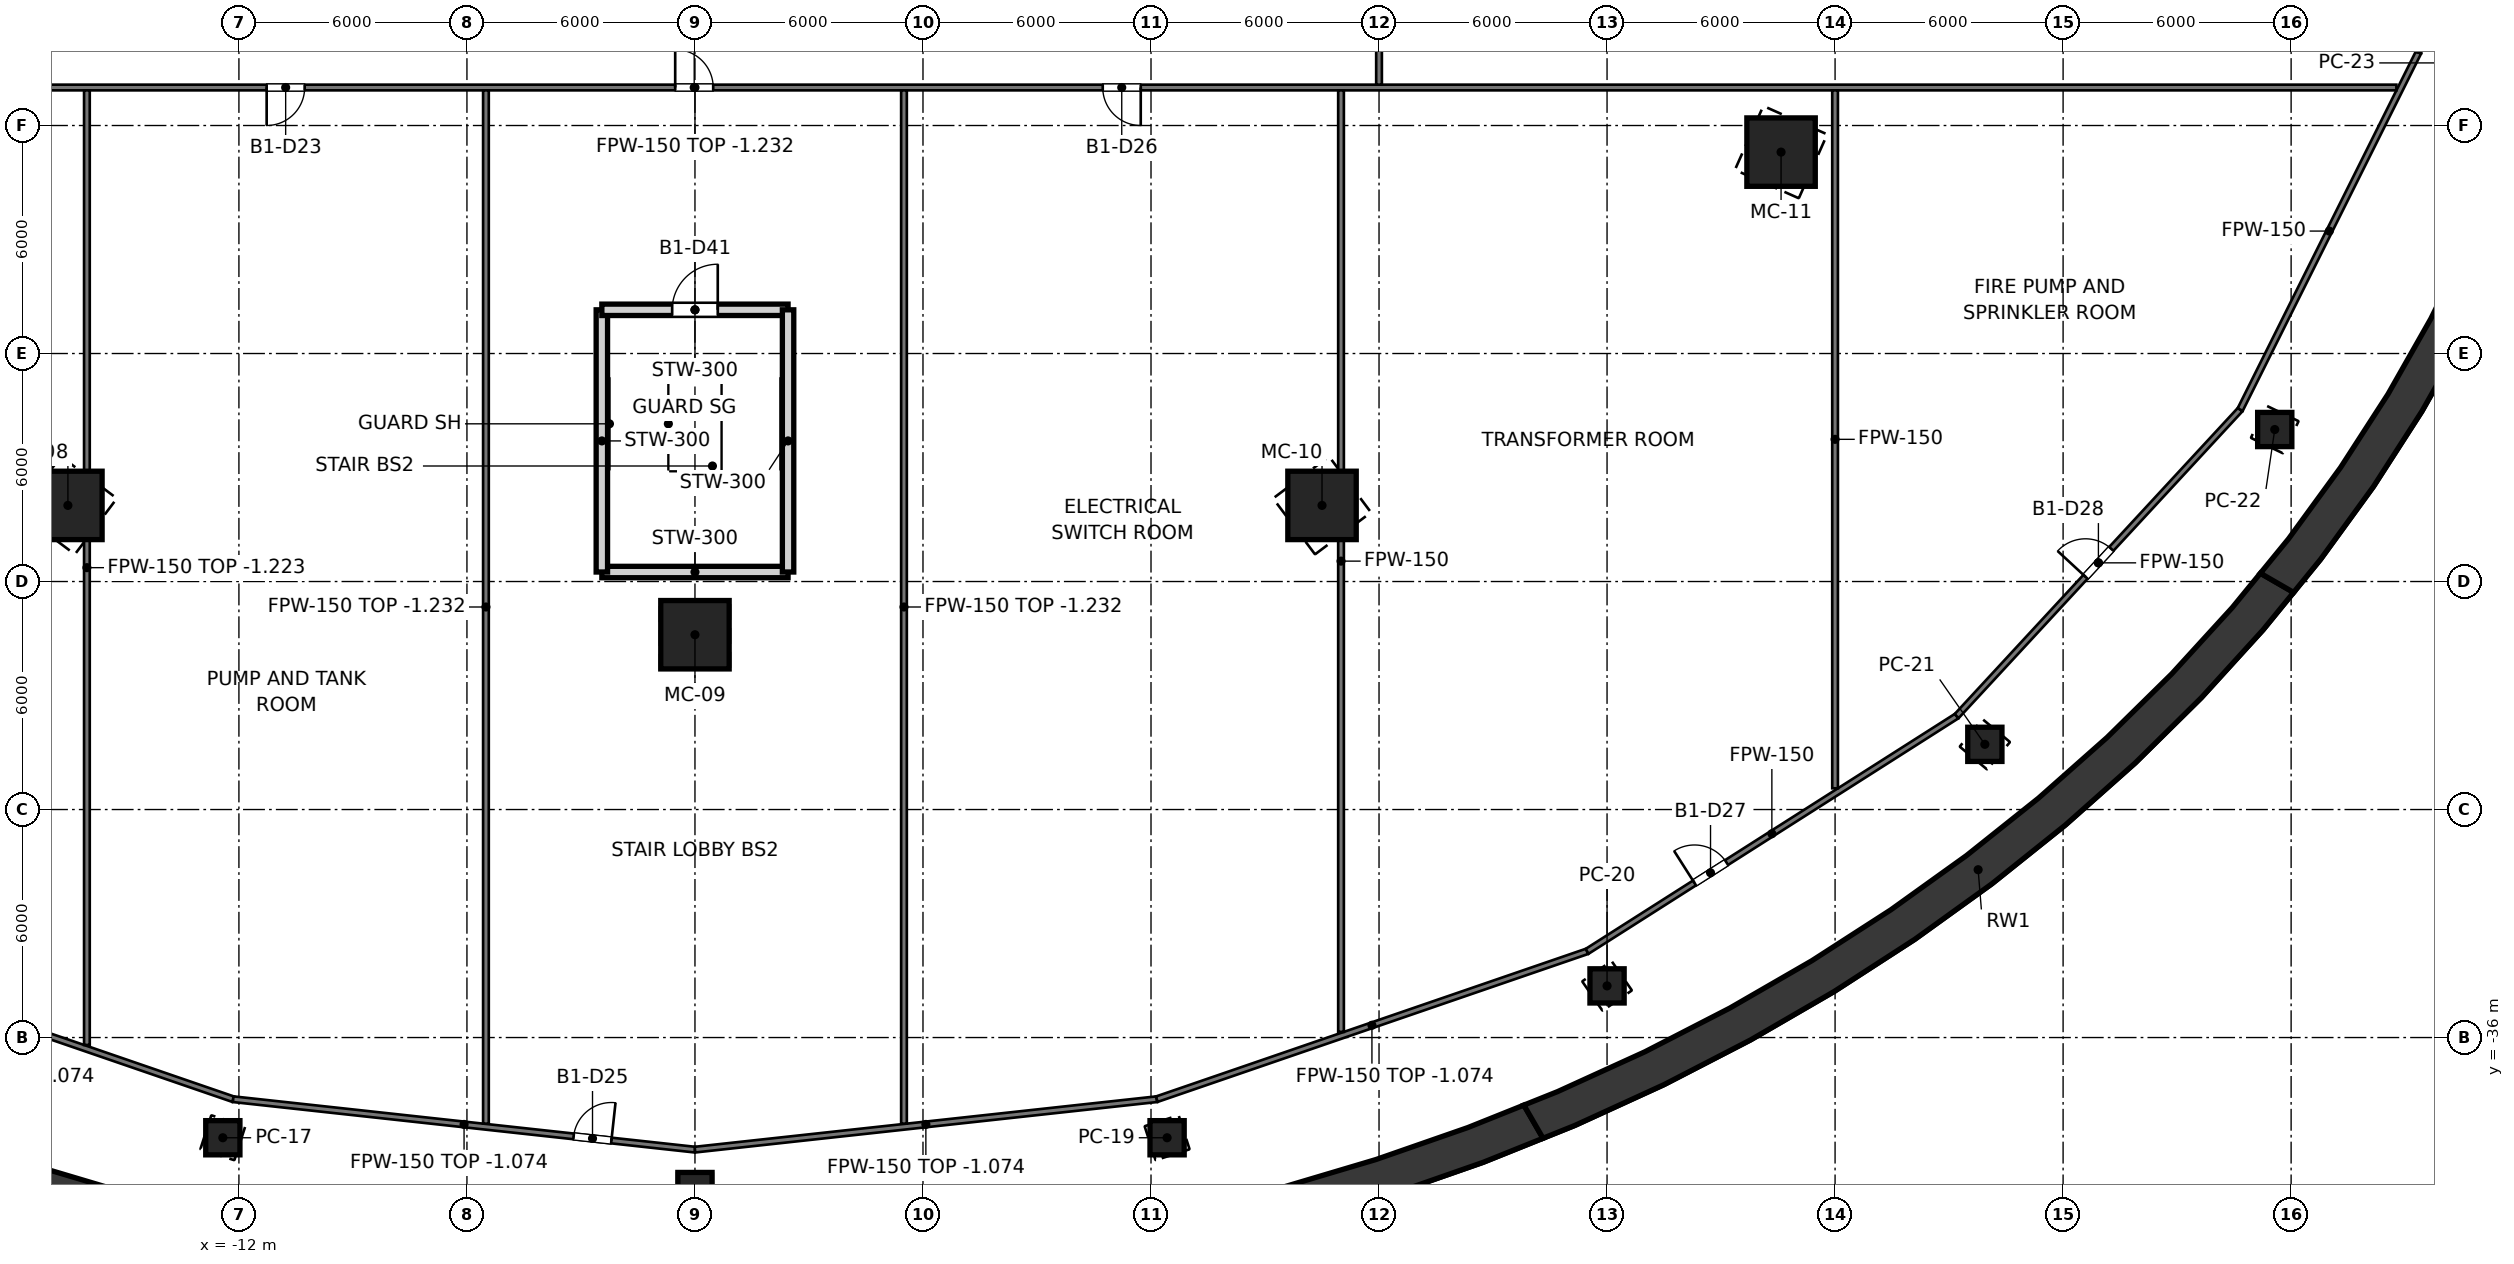
"""IFC4 building model, lengths in metres.
Left out: names, types, materials, properties, quantities, classifications, styles, units other than length and angle.
Written with IfcOpenShell. Run it as: python <this file> out.ifc"""

import sys

from ifc_helpers import new_model, si_unit, direction, frame, frame_2d, origin, origin_2d, place, context, subcontext, project, spatial, polyline, rectangle, hollow_rectangle, outline, extrude, element, fill, save


model = new_model("IFC4")
c1 = context("Model", 3, precision=1e-05, world=origin(), true_north=direction((0.0, 1.0)))
c2 = subcontext(c1, "Body", "Model", "MODEL_VIEW")
j1 = project(units=[si_unit("LENGTHUNIT", "METRE"), si_unit("PLANEANGLEUNIT", "RADIAN")], contexts=[c1])
p1 = place(None, origin())
s1 = spatial("IfcSite", under=j1, at=p1, CompositionType="ELEMENT")
p2 = place(p1, origin())
s2 = spatial("IfcBuilding", under=s1, at=p2, CompositionType="ELEMENT")
p3 = place(p2, frame((0.0, 0.0, -5.0)))
s3 = spatial("IfcBuildingStorey", under=s2, at=p3, CompositionType="ELEMENT", Elevation=-5.0)
p4 = place(p3, frame((0.0, 0.0, -0.3)))
e1 = element("IfcWall", 1, at=p4, inside=s3, PredefinedType="SOLIDWALL", context=c2, shape_type="SweptSolid", body=[
    extrude(outline(polyline([(0.0, -43.0), (0.0, -42.0), (-2.617, -41.942), (-5.226, -41.77), (-7.822, -41.483), (-10.396, -41.082), (-12.941, -40.569), (-15.451, -39.944), (-17.918, -39.21), (-20.337, -38.369), (-21.811, -37.778), (-22.315, -38.651), (-20.744, -39.282), (-18.277, -40.144), (-15.76, -40.896), (-13.2, -41.535), (-10.604, -42.06), (-7.978, -42.471), (-5.331, -42.764), (-2.669, -42.941), (0.0, -43.0)])), origin(), (0.0, 0.0, 1.0), 5.1),
])
e2 = element("IfcWall", 2, at=p4, inside=s3, PredefinedType="SOLIDWALL", context=c2, shape_type="SweptSolid", body=[
    extrude(outline(polyline([(22.315, -38.651), (21.811, -37.778), (20.337, -38.369), (17.918, -39.21), (15.451, -39.944), (12.941, -40.569), (10.396, -41.082), (7.822, -41.483), (5.226, -41.77), (2.617, -41.942), (0.0, -42.0), (0.0, -42.0), (0.0, -43.0), (0.0, -43.0), (2.669, -42.941), (5.331, -42.764), (7.978, -42.471), (10.604, -42.06), (13.2, -41.535), (15.76, -40.896), (18.277, -40.144), (20.744, -39.282), (22.315, -38.651)])), origin(), (0.0, 0.0, 1.0), 5.1),
])
e3 = element("IfcWall", 3, at=p4, inside=s3, PredefinedType="SOLIDWALL", context=c2, shape_type="SweptSolid", body=[
    extrude(outline(polyline([(42.065, -24.287), (41.191, -23.782), (40.451, -24.687), (38.857, -26.431), (37.157, -28.104), (35.355, -29.698), (33.457, -31.212), (31.466, -32.64), (29.389, -33.979), (27.232, -35.224), (25.0, -36.373), (22.699, -37.422), (21.811, -37.778), (22.315, -38.651), (23.154, -38.313), (25.5, -37.239), (27.777, -36.063), (29.977, -34.788), (32.095, -33.417), (34.126, -31.955), (36.062, -30.406), (37.9, -28.773), (39.635, -27.061), (41.26, -25.275), (42.065, -24.287)])), origin(), (0.0, 0.0, 1.0), 5.1),
])
e4 = element("IfcWall", 4, at=p4, inside=s3, PredefinedType="SOLIDWALL", context=c2, shape_type="SweptSolid", body=[
    extrude(outline(polyline([(50.93, -2.25), (51.0, 0.0), (50.0, 0.0), (49.931, -2.198), (49.726, -4.39), (49.385, -6.57), (48.907, -8.732), (48.296, -10.87), (47.553, -12.979), (46.679, -15.052), (45.677, -17.083), (44.55, -19.068), (43.301, -21.0), (41.934, -22.875), (41.191, -23.782), (42.065, -24.287), (42.772, -23.419), (44.167, -21.5), (45.441, -19.521), (46.591, -17.49), (47.613, -15.41), (48.504, -13.288), (49.262, -11.129), (49.885, -8.94), (50.372, -6.727), (50.721, -4.495), (50.93, -2.25)])), origin(), (0.0, 0.0, 1.0), 5.1),
])
for number, where, z_axis, x_axis in (
    (5, (-16.5, -21.997, -0.3), (0.0, 0.0, 1.0), (-0.6, -0.8, 0.0)),
    (6, (0.0, -25.4, -0.3), (0.0, 0.0, 1.0), (0.0, -1.0, 0.0)),
    (7, (16.5, -21.997, -0.3), (0.0, 0.0, 1.0), (0.6, -0.8, 0.0)),
    (8, (28.579, -12.7, -0.3), (0.0, 0.0, 1.0), (0.914, -0.406, 0.0)),
):
    element("IfcColumn", number, at=place(p3, frame(where, z_axis=z_axis, x_axis=x_axis)), inside=s3, PredefinedType="COLUMN", context=c2, shape_type="SweptSolid", body=[
        extrude(hollow_rectangle(XDim=1.8, YDim=1.8, WallThickness=0.08, at=origin_2d()), origin(), (0.0, 0.0, 1.0), 5.3),
    ])
for number, where, z_axis, x_axis in (
    (9, (-12.423, -38.637, -0.3), (0.0, 0.0, 1.0), (-0.306, -0.952, 0.0)),
    (10, (0.0, -40.0, -0.3), (0.0, 0.0, 1.0), (0.0, -1.0, 0.0)),
    (11, (12.423, -38.637, -0.3), (0.0, 0.0, 1.0), (0.306, -0.952, 0.0)),
    (12, (24.0, -34.641, -0.3), (0.0, 0.0, 1.0), (0.569, -0.822, 0.0)),
    (13, (33.941, -28.284, -0.3), (0.0, 0.0, 1.0), (0.768, -0.64, 0.0)),
    (14, (41.569, -20.0, -0.3), (0.0, 0.0, 1.0), (0.901, -0.434, 0.0)),
):
    element("IfcColumn", number, at=place(p3, frame(where, z_axis=z_axis, x_axis=x_axis)), inside=s3, PredefinedType="COLUMN", context=c2, shape_type="SweptSolid", body=[
        extrude(hollow_rectangle(XDim=0.9, YDim=0.9, WallThickness=0.04, at=origin_2d()), origin(), (0.0, 0.0, 1.0), 5.3),
    ])
p5 = place(p3, frame((2.45, -23.75, 0.0), z_axis=(0.0, 0.0, 1.0), x_axis=(-1.0, 0.0, 0.0)))
e15 = element("IfcWall", 15, at=p5, inside=s3, PredefinedType="SOLIDWALL", context=c2, shape_type="SweptSolid", body=[
    extrude(rectangle(XDim=4.9, YDim=0.3, at=frame_2d((2.45, 0.0))), origin(), (0.0, 0.0, 1.0), 4.7),
])
p6 = place(p3, frame((-2.45, -23.75, 0.0), z_axis=(0.0, 0.0, 1.0), x_axis=(0.0, 1.0, 0.0)))
e16 = element("IfcWall", 16, at=p6, inside=s3, PredefinedType="SOLIDWALL", context=c2, shape_type="SweptSolid", body=[
    extrude(rectangle(XDim=6.9, YDim=0.3, at=frame_2d((3.45, 0.0))), origin(), (0.0, 0.0, 1.0), 4.7),
])
p7 = place(p3, frame((-2.45, -16.85, 0.0), z_axis=(0.0, 0.0, 1.0), x_axis=(1.0, 0.0, 0.0)))
e17 = element("IfcWall", 17, at=p7, inside=s3, PredefinedType="SOLIDWALL", context=c2, shape_type="SweptSolid", body=[
    extrude(rectangle(XDim=4.9, YDim=0.3, at=frame_2d((2.45, 0.0))), origin(), (0.0, 0.0, 1.0), 4.7),
])
p8 = place(p7, frame((1.85, 0.0, 0.0)))
e18 = element("IfcOpeningElement", 18, at=p8, cuts=e17, PredefinedType="OPENING", context=c2, shape_type="SweptSolid", body=[
    extrude(rectangle(XDim=1.2, YDim=2.1, at=frame_2d((0.6, 1.05))), frame((0.0, 0.15, 0.0), z_axis=(0.0, -1.0, 0.0), x_axis=(1.0, 0.0, 0.0)), (0.0, 0.0, 1.0), 0.3),
])
p9 = place(p3, frame((2.45, -16.85, 0.0), z_axis=(0.0, 0.0, 1.0), x_axis=(0.0, -1.0, 0.0)))
e19 = element("IfcWall", 19, at=p9, inside=s3, PredefinedType="SOLIDWALL", context=c2, shape_type="SweptSolid", body=[
    extrude(rectangle(XDim=6.9, YDim=0.3, at=frame_2d((3.45, 0.0))), origin(), (0.0, 0.0, 1.0), 4.7),
])
p10 = place(p3, frame((-23.475, -33.732, 0.0), z_axis=(0.0, 0.0, 1.0), x_axis=(0.945720874623, -0.324980041391, 0.0)))
e20 = element("IfcWall", 20, at=p10, inside=s3, PredefinedType="PARTITIONING", context=c2, shape_type="SweptSolid", body=[
    extrude(rectangle(XDim=11.973, YDim=0.15, at=frame_2d((5.987, 0.0))), origin(), (0.0, 0.0, 1.0), 3.926),
])
p11 = place(p3, frame((-12.152, -37.623, 0.0), z_axis=(0.0, 0.0, 1.0), x_axis=(0.994088780117, -0.108570241069, 0.0)))
e21 = element("IfcWall", 21, at=p11, inside=s3, PredefinedType="PARTITIONING", context=c2, shape_type="SweptSolid", body=[
    extrude(rectangle(XDim=12.224, YDim=0.15, at=frame_2d((6.112, 0.0))), origin(), (0.0, 0.0, 1.0), 3.926),
])
p12 = place(p11, frame((9.012, 0.0, 0.0)))
e22 = element("IfcOpeningElement", 22, at=p12, cuts=e21, PredefinedType="OPENING", context=c2, shape_type="SweptSolid", body=[
    extrude(rectangle(XDim=1.0, YDim=2.1, at=frame_2d((0.5, 1.05))), frame((0.0, 0.075, 0.0), z_axis=(0.0, -1.0, 0.0), x_axis=(1.0, 0.0, 0.0)), (0.0, 0.0, 1.0), 0.15),
])
p13 = place(p3, frame((0.0, -38.95, 0.0), z_axis=(0.0, 0.0, 1.0), x_axis=(0.994088780117, 0.108570241069, 0.0)))
e23 = element("IfcWall", 23, at=p13, inside=s3, PredefinedType="PARTITIONING", context=c2, shape_type="SweptSolid", body=[
    extrude(rectangle(XDim=12.224, YDim=0.15, at=frame_2d((6.112, 0.0))), origin(), (0.0, 0.0, 1.0), 3.926),
])
p14 = place(p3, frame((12.152, -37.623, 0.0), z_axis=(0.0, 0.0, 1.0), x_axis=(0.945720874623, 0.324980041391, 0.0)))
e24 = element("IfcWall", 24, at=p14, inside=s3, PredefinedType="PARTITIONING", context=c2, shape_type="SweptSolid", body=[
    extrude(rectangle(XDim=11.973, YDim=0.15, at=frame_2d((5.987, 0.0))), origin(), (0.0, 0.0, 1.0), 3.926),
])
p15 = place(p3, frame((23.475, -33.732, 0.0), z_axis=(0.0, 0.0, 1.0), x_axis=(0.84357600759, 0.537009794527, 0.0)))
e25 = element("IfcWall", 25, at=p15, inside=s3, PredefinedType="PARTITIONING", context=c2, shape_type="SweptSolid", body=[
    extrude(rectangle(XDim=11.527, YDim=0.15, at=frame_2d((5.763, 0.0))), origin(), (0.0, 0.0, 1.0), 3.845),
])
p16 = place(p15, frame((3.35, 0.0, 0.0)))
e26 = element("IfcOpeningElement", 26, at=p16, cuts=e25, PredefinedType="OPENING", context=c2, shape_type="SweptSolid", body=[
    extrude(rectangle(XDim=1.0, YDim=2.1, at=frame_2d((0.5, 1.05))), frame((0.0, 0.075, 0.0), z_axis=(0.0, -1.0, 0.0), x_axis=(1.0, 0.0, 0.0)), (0.0, 0.0, 1.0), 0.15),
])
p17 = place(p3, frame((33.199, -27.542, 0.0), z_axis=(0.0, 0.0, 1.0), x_axis=(0.679018932137, 0.734120759685, 0.0)))
e27 = element("IfcWall", 27, at=p17, inside=s3, PredefinedType="PARTITIONING", context=c2, shape_type="SweptSolid", body=[
    extrude(rectangle(XDim=10.988, YDim=0.15, at=frame_2d((5.494, 0.0))), origin(), (0.0, 0.0, 1.0), 3.845),
])
p18 = place(p17, frame((4.994, 0.0, 0.0)))
e28 = element("IfcOpeningElement", 28, at=p18, cuts=e27, PredefinedType="OPENING", context=c2, shape_type="SweptSolid", body=[
    extrude(rectangle(XDim=1.0, YDim=2.1, at=frame_2d((0.5, 1.05))), frame((0.0, 0.075, 0.0), z_axis=(0.0, -1.0, 0.0), x_axis=(1.0, 0.0, 0.0)), (0.0, 0.0, 1.0), 0.15),
])
p19 = place(p3, frame((40.66, -19.475, 0.0), z_axis=(0.0, 0.0, 1.0), x_axis=(0.446692676619, 0.894687460879, 0.0)))
e29 = element("IfcWall", 29, at=p19, inside=s3, PredefinedType="PARTITIONING", context=c2, shape_type="SweptSolid", body=[
    extrude(rectangle(XDim=10.5, YDim=0.15, at=frame_2d((5.25, 0.0))), origin(), (0.0, 0.0, 1.0), 3.845),
])
p20 = place(p3, frame((45.35, -10.081, 0.0), z_axis=(0.0, 0.0, 1.0), x_axis=(0.156737547616, 0.98764028936, 0.0)))
e30 = element("IfcWall", 30, at=p20, inside=s3, PredefinedType="PARTITIONING", context=c2, shape_type="SweptSolid", body=[
    extrude(rectangle(XDim=10.207, YDim=0.15, at=frame_2d((5.104, 0.0))), origin(), (0.0, 0.0, 1.0), 3.845),
])
p21 = place(p20, frame((2.5, 0.0, 0.0)))
e31 = element("IfcOpeningElement", 31, at=p21, cuts=e30, PredefinedType="OPENING", context=c2, shape_type="SweptSolid", body=[
    extrude(rectangle(XDim=1.0, YDim=2.1, at=frame_2d((0.5, 1.05))), frame((0.0, 0.075, 0.0), z_axis=(0.0, -1.0, 0.0), x_axis=(1.0, 0.0, 0.0)), (0.0, 0.0, 1.0), 0.15),
])
p22 = place(p20, frame((7.754, 0.0, 0.0)))
e32 = element("IfcOpeningElement", 32, at=p22, cuts=e30, PredefinedType="OPENING", context=c2, shape_type="SweptSolid", body=[
    extrude(rectangle(XDim=1.0, YDim=2.1, at=frame_2d((0.5, 1.05))), frame((0.0, 0.075, 0.0), z_axis=(0.0, -1.0, 0.0), x_axis=(1.0, 0.0, 0.0)), (0.0, 0.0, 1.0), 0.15),
])
p23 = place(p3, frame((-44.77, -11.0, 0.0), z_axis=(0.0, 0.0, 1.0), x_axis=(1.0, 0.0, 0.0)))
e33 = element("IfcWall", 33, at=p23, inside=s3, PredefinedType="PARTITIONING", context=c2, shape_type="SweptSolid", body=[
    extrude(rectangle(XDim=89.54, YDim=0.15, at=frame_2d((44.77, 0.0))), origin(), (0.0, 0.0, 1.0), 3.768),
])
p24 = place(p23, frame((33.5, 0.0, 0.0)))
e34 = element("IfcOpeningElement", 34, at=p24, cuts=e33, PredefinedType="OPENING", context=c2, shape_type="SweptSolid", body=[
    extrude(rectangle(XDim=1.0, YDim=2.1, at=frame_2d((0.5, 1.05))), frame((0.0, 0.075, 0.0), z_axis=(0.0, -1.0, 0.0), x_axis=(1.0, 0.0, 0.0)), (0.0, 0.0, 1.0), 0.15),
])
p25 = place(p23, frame((44.25, 0.0, 0.0)))
e35 = element("IfcOpeningElement", 35, at=p25, cuts=e33, PredefinedType="OPENING", context=c2, shape_type="SweptSolid", body=[
    extrude(rectangle(XDim=1.0, YDim=2.1, at=frame_2d((0.5, 1.05))), frame((0.0, 0.075, 0.0), z_axis=(0.0, -1.0, 0.0), x_axis=(1.0, 0.0, 0.0)), (0.0, 0.0, 1.0), 0.15),
])
p26 = place(p23, frame((55.5, 0.0, 0.0)))
e36 = element("IfcOpeningElement", 36, at=p26, cuts=e33, PredefinedType="OPENING", context=c2, shape_type="SweptSolid", body=[
    extrude(rectangle(XDim=1.0, YDim=2.1, at=frame_2d((0.5, 1.05))), frame((0.0, 0.075, 0.0), z_axis=(0.0, -1.0, 0.0), x_axis=(1.0, 0.0, 0.0)), (0.0, 0.0, 1.0), 0.15),
])
p27 = place(p3, frame((18.0, -10.925, 0.0), z_axis=(0.0, 0.0, 1.0), x_axis=(0.0, 1.0, 0.0)))
e37 = element("IfcWall", 37, at=p27, inside=s3, PredefinedType="PARTITIONING", context=c2, shape_type="SweptSolid", body=[
    extrude(rectangle(XDim=21.85, YDim=0.15, at=frame_2d((10.925, 0.0))), origin(), (0.0, 0.0, 1.0), 3.777),
])
p28 = place(p27, frame((2.95, 0.0, 0.0)))
e38 = element("IfcOpeningElement", 38, at=p28, cuts=e37, PredefinedType="OPENING", context=c2, shape_type="SweptSolid", body=[
    extrude(rectangle(XDim=1.0, YDim=2.1, at=frame_2d((0.5, 1.05))), frame((0.0, 0.075, 0.0), z_axis=(0.0, -1.0, 0.0), x_axis=(1.0, 0.0, 0.0)), (0.0, 0.0, 1.0), 0.15),
])
p29 = place(p27, frame((10.45, 0.0, 0.0)))
e39 = element("IfcOpeningElement", 39, at=p29, cuts=e37, PredefinedType="OPENING", context=c2, shape_type="SweptSolid", body=[
    extrude(rectangle(XDim=1.0, YDim=2.1, at=frame_2d((0.5, 1.05))), frame((0.0, 0.075, 0.0), z_axis=(0.0, -1.0, 0.0), x_axis=(1.0, 0.0, 0.0)), (0.0, 0.0, 1.0), 0.15),
])
p30 = place(p27, frame((17.925, 0.0, 0.0)))
e40 = element("IfcOpeningElement", 40, at=p30, cuts=e37, PredefinedType="OPENING", context=c2, shape_type="SweptSolid", body=[
    extrude(rectangle(XDim=1.0, YDim=2.1, at=frame_2d((0.5, 1.05))), frame((0.0, 0.075, 0.0), z_axis=(0.0, -1.0, 0.0), x_axis=(1.0, 0.0, 0.0)), (0.0, 0.0, 1.0), 0.15),
])
p31 = place(p3, frame((-16.0, -11.075, 0.0), z_axis=(0.0, 0.0, 1.0), x_axis=(0.0, -1.0, 0.0)))
e41 = element("IfcWall", 41, at=p31, inside=s3, PredefinedType="PARTITIONING", context=c2, shape_type="SweptSolid", body=[
    extrude(rectangle(XDim=25.12, YDim=0.15, at=frame_2d((12.56, 0.0))), origin(), (0.0, 0.0, 1.0), 3.777),
])
for number, where, z_axis, x_axis in (
    (42, (-5.5, -11.075, 0.0), (0.0, 0.0, 1.0), (0.0, -1.0, 0.0)),
    (43, (5.5, -11.075, 0.0), (0.0, 0.0, 1.0), (0.0, -1.0, 0.0)),
):
    element("IfcWall", number, at=place(p3, frame(where, z_axis=z_axis, x_axis=x_axis)), inside=s3, PredefinedType="PARTITIONING", context=c2, shape_type="SweptSolid", body=[
        extrude(rectangle(XDim=27.191, YDim=0.15, at=frame_2d((13.595, 0.0))), origin(), (0.0, 0.0, 1.0), 3.768),
    ])
p32 = place(p3, frame((17.0, -11.075, 0.0), z_axis=(0.0, 0.0, 1.0), x_axis=(0.0, -1.0, 0.0)))
e44 = element("IfcWall", 44, at=p32, inside=s3, PredefinedType="PARTITIONING", context=c2, shape_type="SweptSolid", body=[
    extrude(rectangle(XDim=24.777, YDim=0.15, at=frame_2d((12.388, 0.0))), origin(), (0.0, 0.0, 1.0), 3.845),
])
p33 = place(p3, frame((30.0, -11.075, 0.0), z_axis=(0.0, 0.0, 1.0), x_axis=(0.0, -1.0, 0.0)))
e45 = element("IfcWall", 45, at=p33, inside=s3, PredefinedType="PARTITIONING", context=c2, shape_type="SweptSolid", body=[
    extrude(rectangle(XDim=18.366, YDim=0.15, at=frame_2d((9.183, 0.0))), origin(), (0.0, 0.0, 1.0), 3.845),
])
p34 = place(p24, origin())
e46 = element("IfcDoor", 46, at=p34, inside=s3, OperationType="SINGLE_SWING_LEFT", PredefinedType="DOOR", context=c2, shape_type="SweptSolid", body=[
    extrude(rectangle(XDim=1.0, YDim=2.1, at=frame_2d((0.5, 1.05))), frame((0.0, 0.025, 0.0), z_axis=(0.0, -1.0, 0.0), x_axis=(1.0, 0.0, 0.0)), (0.0, 0.0, 1.0), 0.05),
])
fill(e34, e46)
p35 = place(p25, origin())
e47 = element("IfcDoor", 47, at=p35, inside=s3, OperationType="SINGLE_SWING_LEFT", PredefinedType="DOOR", context=c2, shape_type="SweptSolid", body=[
    extrude(rectangle(XDim=1.0, YDim=2.1, at=frame_2d((0.5, 1.05))), frame((0.0, 0.025, 0.0), z_axis=(0.0, -1.0, 0.0), x_axis=(1.0, 0.0, 0.0)), (0.0, 0.0, 1.0), 0.05),
])
fill(e35, e47)
p36 = place(p12, origin())
e48 = element("IfcDoor", 48, at=p36, inside=s3, OperationType="SINGLE_SWING_RIGHT", PredefinedType="DOOR", context=c2, shape_type="SweptSolid", body=[
    extrude(rectangle(XDim=1.0, YDim=2.1, at=frame_2d((0.5, 1.05))), frame((0.0, 0.025, 0.0), z_axis=(0.0, -1.0, 0.0), x_axis=(1.0, 0.0, 0.0)), (0.0, 0.0, 1.0), 0.05),
])
fill(e22, e48)
p37 = place(p26, origin())
e49 = element("IfcDoor", 49, at=p37, inside=s3, OperationType="SINGLE_SWING_RIGHT", PredefinedType="DOOR", context=c2, shape_type="SweptSolid", body=[
    extrude(rectangle(XDim=1.0, YDim=2.1, at=frame_2d((0.5, 1.05))), frame((0.0, 0.025, 0.0), z_axis=(0.0, -1.0, 0.0), x_axis=(1.0, 0.0, 0.0)), (0.0, 0.0, 1.0), 0.05),
])
fill(e36, e49)
p38 = place(p16, origin())
e50 = element("IfcDoor", 50, at=p38, inside=s3, OperationType="SINGLE_SWING_LEFT", PredefinedType="DOOR", context=c2, shape_type="SweptSolid", body=[
    extrude(rectangle(XDim=1.0, YDim=2.1, at=frame_2d((0.5, 1.05))), frame((0.0, 0.025, 0.0), z_axis=(0.0, -1.0, 0.0), x_axis=(1.0, 0.0, 0.0)), (0.0, 0.0, 1.0), 0.05),
])
fill(e26, e50)
p39 = place(p18, origin())
e51 = element("IfcDoor", 51, at=p39, inside=s3, OperationType="SINGLE_SWING_LEFT", PredefinedType="DOOR", context=c2, shape_type="SweptSolid", body=[
    extrude(rectangle(XDim=1.0, YDim=2.1, at=frame_2d((0.5, 1.05))), frame((0.0, 0.025, 0.0), z_axis=(0.0, -1.0, 0.0), x_axis=(1.0, 0.0, 0.0)), (0.0, 0.0, 1.0), 0.05),
])
fill(e28, e51)
p40 = place(p8, origin())
e52 = element("IfcDoor", 52, at=p40, inside=s3, OperationType="SINGLE_SWING_RIGHT", PredefinedType="DOOR", context=c2, shape_type="SweptSolid", body=[
    extrude(rectangle(XDim=1.2, YDim=2.1, at=frame_2d((0.6, 1.05))), frame((0.0, 0.025, 0.0), z_axis=(0.0, -1.0, 0.0), x_axis=(1.0, 0.0, 0.0)), (0.0, 0.0, 1.0), 0.05),
])
fill(e18, e52)
save(model, sys.argv[1])
